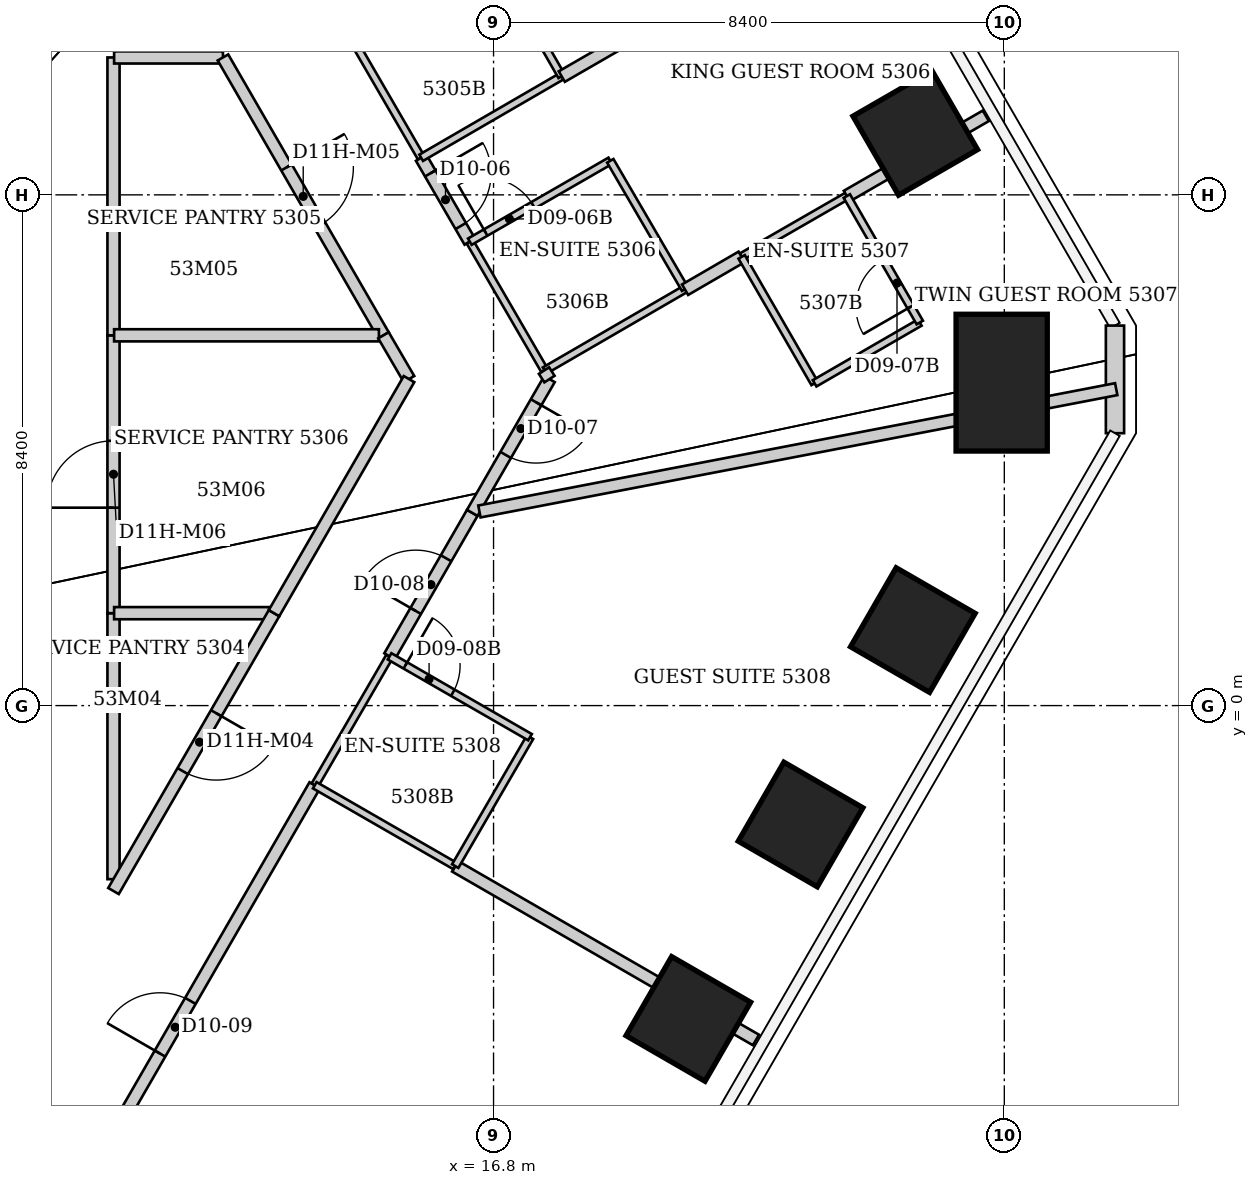
"""IFC4 building model, lengths in metres.
Left out: names, types, materials, properties, quantities, classifications, styles, units other than length and angle.
Written with IfcOpenShell. Run it as: python <this file> out.ifc"""

import sys

from ifc_helpers import new_model, si_unit, direction, frame, frame_2d, origin, origin_2d, place, context, subcontext, project, spatial, rectangle, extrude, element, fill, save


model = new_model("IFC4")
c1 = context("Model", 3, precision=1e-05, world=origin(), true_north=direction((0.0, 1.0)))
c2 = subcontext(c1, "Body", "Model", "MODEL_VIEW")
j1 = project(units=[si_unit("LENGTHUNIT", "METRE"), si_unit("PLANEANGLEUNIT", "RADIAN")], contexts=[c1])
p1 = place(None, origin())
s1 = spatial("IfcSite", under=j1, at=p1, CompositionType="ELEMENT")
p2 = place(p1, origin())
s2 = spatial("IfcBuilding", under=s1, at=p2, CompositionType="ELEMENT")
p3 = place(p2, frame((0.0, 0.0, 213.6)))
s3 = spatial("IfcBuildingStorey", under=s2, at=p3, CompositionType="ELEMENT", Elevation=213.6)
p4 = place(p3, frame((23.735, 9.419, 0.0), z_axis=(0.0, 0.0, 1.0), x_axis=(0.866025403784, 0.5, 0.0)))
e1 = element("IfcColumn", 1, at=p4, inside=s3, PredefinedType="COLUMN", context=c2, shape_type="SweptSolid", body=[
    extrude(rectangle(XDim=1.5, YDim=1.5, at=origin_2d()), origin(), (0.0, 0.0, 1.0), 3.8),
])
p5 = place(p3, frame((25.156, 5.311, 0.0), z_axis=(0.0, 0.0, 1.0), x_axis=(1.0, 0.0, 0.0)))
e2 = element("IfcColumn", 2, at=p5, inside=s3, PredefinedType="COLUMN", context=c2, shape_type="SweptSolid", body=[
    extrude(rectangle(XDim=1.5, YDim=2.25, at=origin_2d()), origin(), (0.0, 0.0, 1.0), 3.8),
])
for number, where, z_axis, x_axis in (
    (3, (23.696, 1.242, 0.0), (0.0, 0.0, 1.0), (0.866, -0.5, 0.0)),
    (4, (21.85, -1.956, 0.0), (0.0, 0.0, 1.0), (0.866, -0.5, 0.0)),
    (5, (20.003, -5.153, 0.0), (0.0, 0.0, 1.0), (0.866, -0.5, 0.0)),
):
    element("IfcColumn", number, at=place(p3, frame(where, z_axis=z_axis, x_axis=x_axis)), inside=s3, PredefinedType="COLUMN", context=c2, shape_type="SweptSolid", body=[
        extrude(rectangle(XDim=1.5, YDim=1.5, at=origin_2d()), origin(), (0.0, 0.0, 1.0), 3.8),
    ])
p6 = place(p3, frame((27.02, 6.25, 0.0), z_axis=(0.0, 0.0, 1.0), x_axis=(0.0, -1.0, 0.0)))
e6 = element("IfcWall", 6, at=p6, inside=s3, PredefinedType="SOLIDWALL", context=c2, shape_type="SweptSolid", body=[
    extrude(rectangle(XDim=1.77, YDim=0.3, at=frame_2d((0.885, 0.0))), origin(), (0.0, 0.0, 1.0), 3.64),
])
p7 = place(p3, frame((9.27, -9.27, 0.0), z_axis=(0.0, 0.0, 1.0), x_axis=(0.499543028754, 0.866289075554, 0.0)))
e7 = element("IfcWall", 7, at=p7, inside=s3, PredefinedType="PARTITIONING", context=c2, shape_type="SweptSolid", body=[
    extrude(rectangle(XDim=9.188, YDim=0.2, at=frame_2d((4.594, 0.0))), origin(), (0.0, 0.0, 1.0), 3.64),
])
p8 = place(p7, frame((4.094, 0.0, 0.0)))
e8 = element("IfcOpeningElement", 8, at=p8, cuts=e7, PredefinedType="OPENING", context=c2, shape_type="SweptSolid", body=[
    extrude(rectangle(XDim=1.0, YDim=2.13, at=frame_2d((0.5, 1.065))), frame((0.0, 0.1, 0.0), z_axis=(0.0, -1.0, 0.0), x_axis=(1.0, 0.0, 0.0)), (0.0, 0.0, 1.0), 0.2),
])
p9 = place(p3, frame((10.55, -2.855, 0.0), z_axis=(0.0, 0.0, 1.0), x_axis=(0.0, 1.0, 0.0)))
e9 = element("IfcWall", 9, at=p9, inside=s3, PredefinedType="PARTITIONING", context=c2, shape_type="SweptSolid", body=[
    extrude(rectangle(XDim=4.375, YDim=0.2, at=frame_2d((2.188, 0.0))), origin(), (0.0, 0.0, 1.0), 3.64),
])
p10 = place(p3, frame((10.55, 1.52, 0.0), z_axis=(0.0, 0.0, 1.0), x_axis=(0.0, 1.0, 0.0)))
e10 = element("IfcWall", 10, at=p10, inside=s3, PredefinedType="PARTITIONING", context=c2, shape_type="SweptSolid", body=[
    extrude(rectangle(XDim=4.57, YDim=0.2, at=frame_2d((2.285, 0.0))), origin(), (0.0, 0.0, 1.0), 3.64),
])
p11 = place(p10, frame((1.735, 0.0, 0.0)))
e11 = element("IfcOpeningElement", 11, at=p11, cuts=e10, PredefinedType="OPENING", context=c2, shape_type="SweptSolid", body=[
    extrude(rectangle(XDim=1.1, YDim=2.2, at=frame_2d((0.55, 1.1))), frame((0.0, 0.1, 0.0), z_axis=(0.0, -1.0, 0.0), x_axis=(1.0, 0.0, 0.0)), (0.0, 0.0, 1.0), 0.2),
])
p12 = place(p3, frame((10.55, 6.09, 0.0), z_axis=(0.0, 0.0, 1.0), x_axis=(0.0, 1.0, 0.0)))
e12 = element("IfcWall", 12, at=p12, inside=s3, PredefinedType="PARTITIONING", context=c2, shape_type="SweptSolid", body=[
    extrude(rectangle(XDim=4.57, YDim=0.2, at=frame_2d((2.285, 0.0))), origin(), (0.0, 0.0, 1.0), 3.64),
])
p13 = place(p3, frame((10.56, 1.52, 0.0), z_axis=(0.0, 0.0, 1.0), x_axis=(1.0, 0.0, 0.0)))
e13 = element("IfcWall", 13, at=p13, inside=s3, PredefinedType="PARTITIONING", context=c2, shape_type="SweptSolid", body=[
    extrude(rectangle(XDim=2.55, YDim=0.2, at=frame_2d((1.275, 0.0))), origin(), (0.0, 0.0, 1.0), 3.64),
])
p14 = place(p3, frame((10.56, 10.66, 0.0), z_axis=(0.0, 0.0, 1.0), x_axis=(1.0, 0.0, 0.0)))
e14 = element("IfcWall", 14, at=p14, inside=s3, PredefinedType="PARTITIONING", context=c2, shape_type="SweptSolid", body=[
    extrude(rectangle(XDim=1.79, YDim=0.2, at=frame_2d((0.895, 0.0))), origin(), (0.0, 0.0, 1.0), 3.64),
])
p15 = place(p3, frame((12.35, 10.66, 0.0), z_axis=(0.0, 0.0, 1.0), x_axis=(0.500213626659, -0.86590203124, 0.0)))
e15 = element("IfcWall", 15, at=p15, inside=s3, PredefinedType="PARTITIONING", context=c2, shape_type="SweptSolid", body=[
    extrude(rectangle(XDim=5.278, YDim=0.2, at=frame_2d((2.639, 0.0))), origin(), (0.0, 0.0, 1.0), 3.64),
])
p16 = place(p15, frame((2.089, 0.0, 0.0)))
e16 = element("IfcOpeningElement", 16, at=p16, cuts=e15, PredefinedType="OPENING", context=c2, shape_type="SweptSolid", body=[
    extrude(rectangle(XDim=1.1, YDim=2.2, at=frame_2d((0.55, 1.1))), frame((0.0, 0.1, 0.0), z_axis=(0.0, -1.0, 0.0), x_axis=(1.0, 0.0, 0.0)), (0.0, 0.0, 1.0), 0.2),
])
p17 = place(p3, frame((13.19, 1.52, 0.0), z_axis=(0.0, 0.0, 1.0), x_axis=(-0.500193590286, -0.865913605527, 0.0)))
e17 = element("IfcWall", 17, at=p17, inside=s3, PredefinedType="PARTITIONING", context=c2, shape_type="SweptSolid", body=[
    extrude(rectangle(XDim=5.278, YDim=0.2, at=frame_2d((2.639, 0.0))), origin(), (0.0, 0.0, 1.0), 3.64),
])
p18 = place(p17, frame((1.9, 0.0, 0.0)))
e18 = element("IfcOpeningElement", 18, at=p18, cuts=e17, PredefinedType="OPENING", context=c2, shape_type="SweptSolid", body=[
    extrude(rectangle(XDim=1.1, YDim=2.2, at=frame_2d((0.55, 1.1))), frame((0.0, 0.1, 0.0), z_axis=(0.0, -1.0, 0.0), x_axis=(1.0, 0.0, 0.0)), (0.0, 0.0, 1.0), 0.2),
])
p19 = place(p3, frame((13.86, -1.31, 0.0), z_axis=(0.0, 0.0, 1.0), x_axis=(0.501813488763, 0.864975850817, 0.0)))
e19 = element("IfcWall", 19, at=p19, inside=s3, PredefinedType="PARTITIONING", context=c2, shape_type="SweptSolid", body=[
    extrude(rectangle(XDim=2.451, YDim=0.12, at=frame_2d((1.226, 0.0))), origin(), (0.0, 0.0, 1.0), 3.64),
])
p20 = place(p3, frame((14.375, 11.137, 0.0), z_axis=(0.0, 0.0, 1.0), x_axis=(0.501931973027, -0.864907101632, 0.0)))
e20 = element("IfcWall", 20, at=p20, inside=s3, PredefinedType="PARTITIONING", context=c2, shape_type="SweptSolid", body=[
    extrude(rectangle(XDim=2.46, YDim=0.12, at=frame_2d((1.23, 0.0))), origin(), (0.0, 0.0, 1.0), 3.64),
])
p21 = place(p3, frame((14.915, 6.09, 0.0), z_axis=(0.0, 0.0, 1.0), x_axis=(-1.0, 0.0, 0.0)))
e21 = element("IfcWall", 21, at=p21, inside=s3, PredefinedType="PARTITIONING", context=c2, shape_type="SweptSolid", body=[
    extrude(rectangle(XDim=4.355, YDim=0.2, at=frame_2d((2.177, 0.0))), origin(), (0.0, 0.0, 1.0), 3.64),
])
p22 = place(p3, frame((14.99, 6.09, 0.0), z_axis=(0.0, 0.0, 1.0), x_axis=(0.503816387241, -0.863810770914, 0.0)))
e22 = element("IfcWall", 22, at=p22, inside=s3, PredefinedType="PARTITIONING", context=c2, shape_type="SweptSolid", body=[
    extrude(rectangle(XDim=0.833, YDim=0.2, at=frame_2d((0.417, 0.0))), origin(), (0.0, 0.0, 1.0), 3.64),
])
p23 = place(p3, frame((15.09, 0.81, 0.0), z_axis=(0.0, 0.0, 1.0), x_axis=(0.499282656393, 0.866439166373, 0.0)))
e23 = element("IfcWall", 23, at=p23, inside=s3, PredefinedType="PARTITIONING", context=c2, shape_type="SweptSolid", body=[
    extrude(rectangle(XDim=2.724, YDim=0.2, at=frame_2d((1.362, 0.0))), origin(), (0.0, 0.0, 1.0), 3.64),
])
p24 = place(p23, frame((0.862, 0.0, 0.0)))
e24 = element("IfcOpeningElement", 24, at=p24, cuts=e23, PredefinedType="OPENING", context=c2, shape_type="SweptSolid", body=[
    extrude(rectangle(XDim=1.0, YDim=2.13, at=frame_2d((0.5, 1.065))), frame((0.0, 0.1, 0.0), z_axis=(0.0, -1.0, 0.0), x_axis=(1.0, 0.0, 0.0)), (0.0, 0.0, 1.0), 0.2),
])
p25 = place(p3, frame((15.41, 5.37, 0.0), z_axis=(0.0, 0.0, 1.0), x_axis=(-0.499513190454, -0.866306281036, 0.0)))
e25 = element("IfcWall", 25, at=p25, inside=s3, PredefinedType="PARTITIONING", context=c2, shape_type="SweptSolid", body=[
    extrude(rectangle(XDim=4.444, YDim=0.2, at=frame_2d((2.222, 0.0))), origin(), (0.0, 0.0, 1.0), 3.64),
])
p26 = place(p3, frame((15.61, 9.01, 0.0), z_axis=(0.0, 0.0, 1.0), x_axis=(0.5014706583, -0.865174652232, 0.0)))
e26 = element("IfcWall", 26, at=p26, inside=s3, PredefinedType="PARTITIONING", context=c2, shape_type="SweptSolid", body=[
    extrude(rectangle(XDim=1.595, YDim=0.2, at=frame_2d((0.797, 0.0))), origin(), (0.0, 0.0, 1.0), 3.64),
])
p27 = place(p26, frame((0.298, 0.0, 0.0)))
e27 = element("IfcOpeningElement", 27, at=p27, cuts=e26, PredefinedType="OPENING", context=c2, shape_type="SweptSolid", body=[
    extrude(rectangle(XDim=1.0, YDim=2.13, at=frame_2d((0.5, 1.065))), frame((0.0, 0.1, 0.0), z_axis=(0.0, -1.0, 0.0), x_axis=(1.0, 0.0, 0.0)), (0.0, 0.0, 1.0), 0.2),
])
p28 = place(p3, frame((16.168, -2.643, 0.0), z_axis=(0.0, 0.0, 1.0), x_axis=(0.865980633471, -0.500077536441, 0.0)))
e28 = element("IfcWall", 28, at=p28, inside=s3, PredefinedType="PARTITIONING", context=c2, shape_type="SweptSolid", body=[
    extrude(rectangle(XDim=5.713, YDim=0.2, at=frame_2d((2.857, 0.0))), origin(), (0.0, 0.0, 1.0), 3.64),
])
p29 = place(p3, frame((16.17, -2.64, 0.0), z_axis=(0.0, 0.0, 1.0), x_axis=(-0.86663205897, 0.498947767172, 0.0)))
e29 = element("IfcWall", 29, at=p29, inside=s3, PredefinedType="PARTITIONING", context=c2, shape_type="SweptSolid", body=[
    extrude(rectangle(XDim=2.665, YDim=0.12, at=frame_2d((1.333, 0.0))), origin(), (0.0, 0.0, 1.0), 3.64),
])
for number, where, z_axis, x_axis in (
    (30, (16.17, -2.64, 0.0), (0.0, 0.0, 1.0), (0.502, 0.865, 0.0)),
    (31, (16.41, 7.63, 0.0), (0.0, 0.0, 1.0), (0.502, -0.865, 0.0)),
):
    element("IfcWall", number, at=place(p3, frame(where, z_axis=z_axis, x_axis=x_axis)), inside=s3, PredefinedType="PARTITIONING", context=c2, shape_type="SweptSolid", body=[
        extrude(rectangle(XDim=2.451, YDim=0.12, at=frame_2d((1.226, 0.0))), origin(), (0.0, 0.0, 1.0), 3.64),
    ])
p30 = place(p3, frame((16.45, 3.17, 0.0), z_axis=(0.0, 0.0, 1.0), x_axis=(0.499922110319, 0.866070368743, 0.0)))
e32 = element("IfcWall", 32, at=p30, inside=s3, PredefinedType="PARTITIONING", context=c2, shape_type="SweptSolid", body=[
    extrude(rectangle(XDim=2.541, YDim=0.2, at=frame_2d((1.27, 0.0))), origin(), (0.0, 0.0, 1.0), 3.64),
])
p31 = place(p30, frame((1.1, 0.0, 0.0)))
e33 = element("IfcOpeningElement", 33, at=p31, cuts=e32, PredefinedType="OPENING", context=c2, shape_type="SweptSolid", body=[
    extrude(rectangle(XDim=1.0, YDim=2.13, at=frame_2d((0.5, 1.065))), frame((0.0, 0.1, 0.0), z_axis=(0.0, -1.0, 0.0), x_axis=(1.0, 0.0, 0.0)), (0.0, 0.0, 1.0), 0.2),
])
p32 = place(p3, frame((17.4, -0.52, 0.0), z_axis=(0.0, 0.0, 1.0), x_axis=(-0.866592449628, 0.499016559092, 0.0)))
e34 = element("IfcWall", 34, at=p32, inside=s3, PredefinedType="PARTITIONING", context=c2, shape_type="SweptSolid", body=[
    extrude(rectangle(XDim=2.665, YDim=0.12, at=frame_2d((1.333, 0.0))), origin(), (0.0, 0.0, 1.0), 3.64),
])
p33 = place(p32, frame((1.466, 0.0, 0.0)))
e35 = element("IfcOpeningElement", 35, at=p33, cuts=e34, PredefinedType="OPENING", context=c2, shape_type="SweptSolid", body=[
    extrude(rectangle(XDim=0.9, YDim=2.03, at=frame_2d((0.45, 1.015))), frame((0.0, 0.06, 0.0), z_axis=(0.0, -1.0, 0.0), x_axis=(1.0, 0.0, 0.0)), (0.0, 0.0, 1.0), 0.12),
])
p34 = place(p3, frame((17.64, 5.51, 0.0), z_axis=(0.0, 0.0, 1.0), x_axis=(0.86498992408, 0.501789229896, 0.0)))
e36 = element("IfcWall", 36, at=p34, inside=s3, PredefinedType="PARTITIONING", context=c2, shape_type="SweptSolid", body=[
    extrude(rectangle(XDim=2.671, YDim=0.12, at=frame_2d((1.335, 0.0))), origin(), (0.0, 0.0, 1.0), 3.64),
])
p35 = place(p3, frame((17.72, 5.37, 0.0), z_axis=(0.0, 0.0, 1.0), x_axis=(-0.540386452408, 0.841416948994, 0.0)))
e37 = element("IfcWall", 37, at=p35, inside=s3, PredefinedType="PARTITIONING", context=c2, shape_type="SweptSolid", body=[
    extrude(rectangle(XDim=0.166, YDim=0.2, at=frame_2d((0.083, 0.0))), origin(), (0.0, 0.0, 1.0), 3.64),
])
p36 = place(p3, frame((17.92, 10.35, 0.0), z_axis=(0.0, 0.0, 1.0), x_axis=(-0.864966903181, -0.501828911485, 0.0)))
e38 = element("IfcWall", 38, at=p36, inside=s3, PredefinedType="PARTITIONING", context=c2, shape_type="SweptSolid", body=[
    extrude(rectangle(XDim=2.67, YDim=0.12, at=frame_2d((1.335, 0.0))), origin(), (0.0, 0.0, 1.0), 2.878),
])
p37 = place(p3, frame((17.92, 10.35, 0.0), z_axis=(0.0, 0.0, 1.0), x_axis=(-0.498791783817, 0.866721844883, 0.0)))
e39 = element("IfcWall", 39, at=p37, inside=s3, PredefinedType="PARTITIONING", context=c2, shape_type="SweptSolid", body=[
    extrude(rectangle(XDim=2.446, YDim=0.12, at=frame_2d((1.223, 0.0))), origin(), (0.0, 0.0, 1.0), 3.64),
])
p38 = place(p3, frame((17.923, 10.345, 0.0), z_axis=(0.0, 0.0, 1.0), x_axis=(0.865991848905, 0.500058114253, 0.0)))
e40 = element("IfcWall", 40, at=p38, inside=s3, PredefinedType="PARTITIONING", context=c2, shape_type="SweptSolid", body=[
    extrude(rectangle(XDim=5.708, YDim=0.2, at=frame_2d((2.854, 0.0))), origin(), (0.0, 0.0, 1.0), 2.878),
])
p39 = place(p3, frame((18.72, 8.96, 0.0), z_axis=(0.0, 0.0, 1.0), x_axis=(-0.866654860089, -0.498908161372, 0.0)))
e41 = element("IfcWall", 41, at=p39, inside=s3, PredefinedType="PARTITIONING", context=c2, shape_type="SweptSolid", body=[
    extrude(rectangle(XDim=2.666, YDim=0.12, at=frame_2d((1.333, 0.0))), origin(), (0.0, 0.0, 1.0), 3.64),
])
p40 = place(p39, frame((1.466, 0.0, 0.0)))
e42 = element("IfcOpeningElement", 42, at=p40, cuts=e41, PredefinedType="OPENING", context=c2, shape_type="SweptSolid", body=[
    extrude(rectangle(XDim=0.9, YDim=2.03, at=frame_2d((0.45, 1.015))), frame((0.0, 0.06, 0.0), z_axis=(0.0, -1.0, 0.0), x_axis=(1.0, 0.0, 0.0)), (0.0, 0.0, 1.0), 0.12),
])
p41 = place(p3, frame((19.95, 6.85, 0.0), z_axis=(0.0, 0.0, 1.0), x_axis=(-0.503634814725, 0.863916647251, 0.0)))
e43 = element("IfcWall", 43, at=p41, inside=s3, PredefinedType="PARTITIONING", context=c2, shape_type="SweptSolid", body=[
    extrude(rectangle(XDim=2.442, YDim=0.12, at=frame_2d((1.221, 0.0))), origin(), (0.0, 0.0, 1.0), 3.64),
])
p42 = place(p3, frame((20.878, 7.383, 0.0), z_axis=(0.0, 0.0, 1.0), x_axis=(0.866697688948, 0.498833755847, 0.0)))
e44 = element("IfcWall", 44, at=p42, inside=s3, PredefinedType="PARTITIONING", context=c2, shape_type="SweptSolid", body=[
    extrude(rectangle(XDim=1.998, YDim=0.12, at=frame_2d((0.999, 0.0))), origin(), (0.0, 0.0, 1.0), 3.64),
])
p43 = place(p3, frame((20.88, 7.38, 0.0), z_axis=(0.0, 0.0, 1.0), x_axis=(-0.864855730486, -0.502020483094, 0.0)))
e45 = element("IfcWall", 45, at=p43, inside=s3, PredefinedType="PARTITIONING", context=c2, shape_type="SweptSolid", body=[
    extrude(rectangle(XDim=1.075, YDim=0.2, at=frame_2d((0.538, 0.0))), origin(), (0.0, 0.0, 1.0), 3.64),
])
p44 = place(p3, frame((20.88, 7.38, 0.0), z_axis=(0.0, 0.0, 1.0), x_axis=(0.499813401482, -0.866133109688, 0.0)))
e46 = element("IfcWall", 46, at=p44, inside=s3, PredefinedType="PARTITIONING", context=c2, shape_type="SweptSolid", body=[
    extrude(rectangle(XDim=2.401, YDim=0.12, at=frame_2d((1.201, 0.0))), origin(), (0.0, 0.0, 1.0), 3.64),
])
p45 = place(p3, frame((22.08, 5.3, 0.0), z_axis=(0.0, 0.0, 1.0), x_axis=(0.865766263046, 0.50044857655, 0.0)))
e47 = element("IfcWall", 47, at=p45, inside=s3, PredefinedType="PARTITIONING", context=c2, shape_type="SweptSolid", body=[
    extrude(rectangle(XDim=1.998, YDim=0.12, at=frame_2d((0.999, 0.0))), origin(), (0.0, 0.0, 1.0), 3.64),
])
p46 = place(p3, frame((22.61, 8.38, 0.0), z_axis=(0.0, 0.0, 1.0), x_axis=(0.865974560031, 0.500088053625, 0.0)))
e48 = element("IfcWall", 48, at=p46, inside=s3, PredefinedType="PARTITIONING", context=c2, shape_type="SweptSolid", body=[
    extrude(rectangle(XDim=2.64, YDim=0.2, at=frame_2d((1.32, 0.0))), origin(), (0.0, 0.0, 1.0), 3.64),
])
p47 = place(p3, frame((23.81, 6.3, 0.0), z_axis=(0.0, 0.0, 1.0), x_axis=(-0.499737123639, 0.866177122335, 0.0)))
e49 = element("IfcWall", 49, at=p47, inside=s3, PredefinedType="PARTITIONING", context=c2, shape_type="SweptSolid", body=[
    extrude(rectangle(XDim=2.401, YDim=0.12, at=frame_2d((1.201, 0.0))), origin(), (0.0, 0.0, 1.0), 3.64),
])
p48 = place(p47, frame((0.3, 0.0, 0.0)))
e50 = element("IfcOpeningElement", 50, at=p48, cuts=e49, PredefinedType="OPENING", context=c2, shape_type="SweptSolid", body=[
    extrude(rectangle(XDim=0.9, YDim=2.03, at=frame_2d((0.45, 1.015))), frame((0.0, 0.06, 0.0), z_axis=(0.0, -1.0, 0.0), x_axis=(1.0, 0.0, 0.0)), (0.0, 0.0, 1.0), 0.12),
])
p49 = place(p3, frame((27.041, 5.204, 0.0), z_axis=(0.0, 0.0, 1.0), x_axis=(-0.98204561609, -0.188643600256, 0.0)))
e51 = element("IfcWall", 51, at=p49, inside=s3, PredefinedType="PARTITIONING", context=c2, shape_type="SweptSolid", body=[
    extrude(rectangle(XDim=10.664, YDim=0.2, at=frame_2d((5.332, 0.0))), origin(), (0.0, 0.0, 1.0), 3.64),
])
p50 = place(p27, origin())
e52 = element("IfcDoor", 52, at=p50, inside=s3, OperationType="SINGLE_SWING_LEFT", PredefinedType="DOOR", context=c2, shape_type="SweptSolid", body=[
    extrude(rectangle(XDim=1.0, YDim=2.13, at=frame_2d((0.5, 1.065))), frame((0.0, 0.025, 0.0), z_axis=(0.0, -1.0, 0.0), x_axis=(1.0, 0.0, 0.0)), (0.0, 0.0, 1.0), 0.05),
])
fill(e27, e52)
p51 = place(p40, origin())
e53 = element("IfcDoor", 53, at=p51, inside=s3, OperationType="SINGLE_SWING_RIGHT", PredefinedType="DOOR", context=c2, shape_type="SweptSolid", body=[
    extrude(rectangle(XDim=0.9, YDim=2.03, at=frame_2d((0.45, 1.015))), frame((0.0, 0.025, 0.0), z_axis=(0.0, -1.0, 0.0), x_axis=(1.0, 0.0, 0.0)), (0.0, 0.0, 1.0), 0.05),
])
fill(e42, e53)
p52 = place(p31, origin())
e54 = element("IfcDoor", 54, at=p52, inside=s3, OperationType="SINGLE_SWING_RIGHT", PredefinedType="DOOR", context=c2, shape_type="SweptSolid", body=[
    extrude(rectangle(XDim=1.0, YDim=2.13, at=frame_2d((0.5, 1.065))), frame((0.0, 0.025, 0.0), z_axis=(0.0, -1.0, 0.0), x_axis=(1.0, 0.0, 0.0)), (0.0, 0.0, 1.0), 0.05),
])
fill(e33, e54)
p53 = place(p48, origin())
e55 = element("IfcDoor", 55, at=p53, inside=s3, OperationType="SINGLE_SWING_LEFT", PredefinedType="DOOR", context=c2, shape_type="SweptSolid", body=[
    extrude(rectangle(XDim=0.9, YDim=2.03, at=frame_2d((0.45, 1.015))), frame((0.0, 0.025, 0.0), z_axis=(0.0, -1.0, 0.0), x_axis=(1.0, 0.0, 0.0)), (0.0, 0.0, 1.0), 0.05),
])
fill(e50, e55)
p54 = place(p24, origin())
e56 = element("IfcDoor", 56, at=p54, inside=s3, OperationType="SINGLE_SWING_LEFT", PredefinedType="DOOR", context=c2, shape_type="SweptSolid", body=[
    extrude(rectangle(XDim=1.0, YDim=2.13, at=frame_2d((0.5, 1.065))), frame((0.0, 0.025, 0.0), z_axis=(0.0, -1.0, 0.0), x_axis=(1.0, 0.0, 0.0)), (0.0, 0.0, 1.0), 0.05),
])
fill(e24, e56)
p55 = place(p33, origin())
e57 = element("IfcDoor", 57, at=p55, inside=s3, OperationType="SINGLE_SWING_RIGHT", PredefinedType="DOOR", context=c2, shape_type="SweptSolid", body=[
    extrude(rectangle(XDim=0.9, YDim=2.03, at=frame_2d((0.45, 1.015))), frame((0.0, 0.025, 0.0), z_axis=(0.0, -1.0, 0.0), x_axis=(1.0, 0.0, 0.0)), (0.0, 0.0, 1.0), 0.05),
])
fill(e35, e57)
p56 = place(p8, origin())
e58 = element("IfcDoor", 58, at=p56, inside=s3, OperationType="SINGLE_SWING_LEFT", PredefinedType="DOOR", context=c2, shape_type="SweptSolid", body=[
    extrude(rectangle(XDim=1.0, YDim=2.13, at=frame_2d((0.5, 1.065))), frame((0.0, 0.025, 0.0), z_axis=(0.0, -1.0, 0.0), x_axis=(1.0, 0.0, 0.0)), (0.0, 0.0, 1.0), 0.05),
])
fill(e8, e58)
p57 = place(p18, origin())
e59 = element("IfcDoor", 59, at=p57, inside=s3, OperationType="SINGLE_SWING_LEFT", PredefinedType="DOOR", context=c2, shape_type="SweptSolid", body=[
    extrude(rectangle(XDim=1.1, YDim=2.2, at=frame_2d((0.55, 1.1))), frame((0.0, 0.025, 0.0), z_axis=(0.0, -1.0, 0.0), x_axis=(1.0, 0.0, 0.0)), (0.0, 0.0, 1.0), 0.05),
])
fill(e18, e59)
p58 = place(p16, origin())
e60 = element("IfcDoor", 60, at=p58, inside=s3, OperationType="SINGLE_SWING_LEFT", PredefinedType="DOOR", context=c2, shape_type="SweptSolid", body=[
    extrude(rectangle(XDim=1.1, YDim=2.2, at=frame_2d((0.55, 1.1))), frame((0.0, 0.025, 0.0), z_axis=(0.0, -1.0, 0.0), x_axis=(1.0, 0.0, 0.0)), (0.0, 0.0, 1.0), 0.05),
])
fill(e16, e60)
p59 = place(p11, origin())
e61 = element("IfcDoor", 61, at=p59, inside=s3, OperationType="SINGLE_SWING_LEFT", PredefinedType="DOOR", context=c2, shape_type="SweptSolid", body=[
    extrude(rectangle(XDim=1.1, YDim=2.2, at=frame_2d((0.55, 1.1))), frame((0.0, 0.025, 0.0), z_axis=(0.0, -1.0, 0.0), x_axis=(1.0, 0.0, 0.0)), (0.0, 0.0, 1.0), 0.05),
])
fill(e11, e61)
save(model, sys.argv[1])
